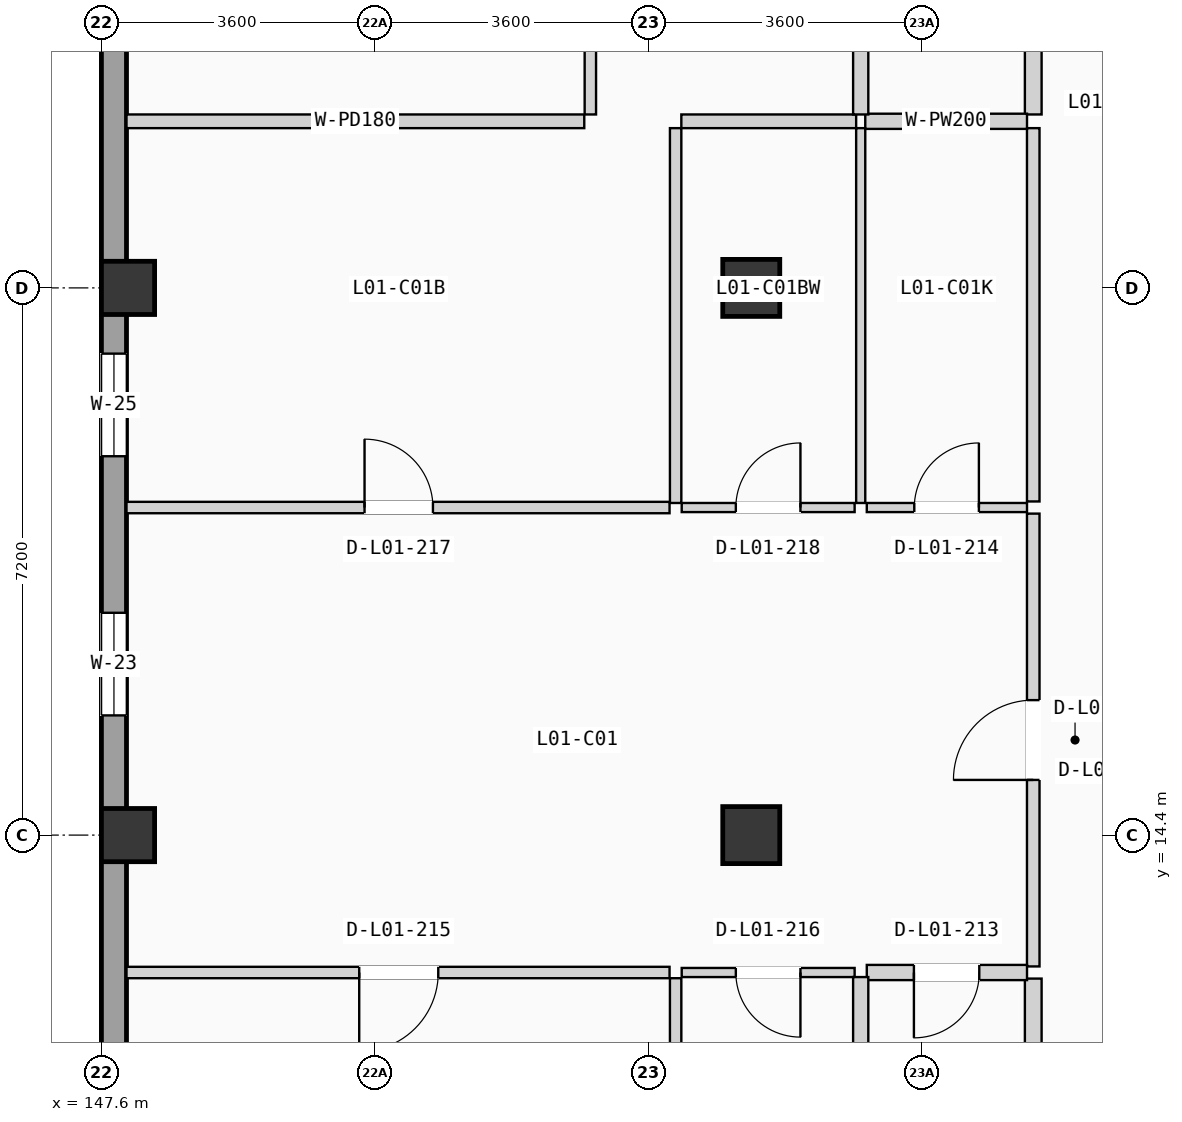
"""IFC4 building model, lengths in metres.
Left out: names, types, materials, properties, quantities, classifications, styles, units other than length and angle.
Written with IfcOpenShell. Run it as: python <this file> out.ifc"""

import sys

from ifc_helpers import new_model, si_unit, direction, frame, frame_2d, origin, origin_2d, place, context, subcontext, project, spatial, rectangle, extrude, element, fill, save


model = new_model("IFC4")
c1 = context("Model", 3, precision=1e-05, world=origin(), true_north=direction((0.0, 1.0)))
c2 = subcontext(c1, "Body", "Model", "MODEL_VIEW")
j1 = project(units=[si_unit("LENGTHUNIT", "METRE"), si_unit("PLANEANGLEUNIT", "RADIAN")], contexts=[c1])
p1 = place(None, origin())
s1 = spatial("IfcSite", under=j1, at=p1, CompositionType="ELEMENT")
p2 = place(p1, origin())
s2 = spatial("IfcBuilding", under=s1, at=p2, CompositionType="ELEMENT")
p3 = place(p2, frame((0.0, 0.0, 4.9)))
s3 = spatial("IfcBuildingStorey", under=s2, at=p3, CompositionType="ELEMENT", Elevation=4.9)
for number, where, z_axis, x_axis in (
    (1, (147.95, 14.4, 0.0), (0.0, 0.0, 1.0), (1.0, 0.0, 0.0)),
    (2, (147.95, 21.6, 0.0), (0.0, 0.0, 1.0), (1.0, 0.0, 0.0)),
):
    element("IfcColumn", number, at=place(p3, frame(where, z_axis=z_axis, x_axis=x_axis)), inside=s3, PredefinedType="COLUMN", context=c2, shape_type="SweptSolid", body=[
        extrude(rectangle(XDim=0.7, YDim=0.7, at=origin_2d()), origin(), (0.0, 0.0, 1.0), 3.675),
    ])
for number, where, z_axis, x_axis in (
    (3, (156.15, 14.4, 0.0), (0.0, 0.0, 1.0), (1.0, 0.0, 0.0)),
    (4, (156.15, 21.6, 0.0), (0.0, 0.0, 1.0), (1.0, 0.0, 0.0)),
):
    element("IfcColumn", number, at=place(p3, frame(where, z_axis=z_axis, x_axis=x_axis)), inside=s3, PredefinedType="COLUMN", context=c2, shape_type="SweptSolid", body=[
        extrude(rectangle(XDim=0.75, YDim=0.75, at=origin_2d()), origin(), (0.0, 0.0, 1.0), 3.675),
    ])
p4 = place(p3, frame((147.765, 0.33, 0.0), z_axis=(0.0, 0.0, 1.0), x_axis=(0.0, 1.0, 0.0)))
e5 = element("IfcWall", 5, at=p4, inside=s3, PredefinedType="SOLIDWALL", context=c2, shape_type="SweptSolid", body=[
    extrude(rectangle(XDim=49.74, YDim=0.33, at=frame_2d((24.87, 0.0))), origin(), (0.0, 0.0, 1.0), 3.415),
])
p5 = place(p4, frame((15.645, 0.0, 0.9)))
e6 = element("IfcOpeningElement", 6, at=p5, cuts=e5, PredefinedType="OPENING", context=c2, shape_type="SweptSolid", body=[
    extrude(rectangle(XDim=1.35, YDim=1.5, at=frame_2d((0.675, 0.75))), frame((0.0, 0.175, 0.0), z_axis=(0.0, -1.0, 0.0), x_axis=(1.0, 0.0, 0.0)), (0.0, 0.0, 1.0), 0.35),
])
p6 = place(p4, frame((9.051, 0.0, 0.9)))
e7 = element("IfcOpeningElement", 7, at=p6, cuts=e5, PredefinedType="OPENING", context=c2, shape_type="SweptSolid", body=[
    extrude(rectangle(XDim=1.35, YDim=1.65, at=frame_2d((0.675, 0.825))), frame((0.0, 0.175, 0.0), z_axis=(0.0, -1.0, 0.0), x_axis=(1.0, 0.0, 0.0)), (0.0, 0.0, 1.0), 0.35),
])
p7 = place(p4, frame((19.055, 0.0, 0.9)))
e8 = element("IfcOpeningElement", 8, at=p7, cuts=e5, PredefinedType="OPENING", context=c2, shape_type="SweptSolid", body=[
    extrude(rectangle(XDim=1.35, YDim=1.8, at=frame_2d((0.675, 0.9))), frame((0.0, 0.175, 0.0), z_axis=(0.0, -1.0, 0.0), x_axis=(1.0, 0.0, 0.0)), (0.0, 0.0, 1.0), 0.35),
])
p8 = place(p4, frame((31.351, 0.0, 0.9)))
e9 = element("IfcOpeningElement", 9, at=p8, cuts=e5, PredefinedType="OPENING", context=c2, shape_type="SweptSolid", body=[
    extrude(rectangle(XDim=1.48, YDim=1.2, at=frame_2d((0.74, 0.6))), frame((0.0, 0.175, 0.0), z_axis=(0.0, -1.0, 0.0), x_axis=(1.0, 0.0, 0.0)), (0.0, 0.0, 1.0), 0.35),
])
p9 = place(p4, frame((25.136, 0.0, 0.9)))
e10 = element("IfcOpeningElement", 10, at=p9, cuts=e5, PredefinedType="OPENING", context=c2, shape_type="SweptSolid", body=[
    extrude(rectangle(XDim=1.48, YDim=1.35, at=frame_2d((0.74, 0.675))), frame((0.0, 0.175, 0.0), z_axis=(0.0, -1.0, 0.0), x_axis=(1.0, 0.0, 0.0)), (0.0, 0.0, 1.0), 0.35),
])
p10 = place(p4, frame((38.465, 0.0, 0.9)))
e11 = element("IfcOpeningElement", 11, at=p10, cuts=e5, PredefinedType="OPENING", context=c2, shape_type="SweptSolid", body=[
    extrude(rectangle(XDim=1.48, YDim=1.5, at=frame_2d((0.74, 0.75))), frame((0.0, 0.175, 0.0), z_axis=(0.0, -1.0, 0.0), x_axis=(1.0, 0.0, 0.0)), (0.0, 0.0, 1.0), 0.35),
])
p11 = place(p3, frame((159.86, 12.672, 0.0), z_axis=(0.0, 0.0, 1.0), x_axis=(0.0, 1.0, 0.0)))
e12 = element("IfcWall", 12, at=p11, inside=s3, PredefinedType="PARTITIONING", context=c2, shape_type="SweptSolid", body=[
    extrude(rectangle(XDim=5.958, YDim=0.165, at=frame_2d((2.979, 0.0))), origin(), (0.0, 0.0, 1.0), 3.395),
])
p12 = place(p11, frame((2.454, 0.0, 0.0)))
e13 = element("IfcOpeningElement", 13, at=p12, cuts=e12, PredefinedType="OPENING", context=c2, shape_type="SweptSolid", body=[
    extrude(rectangle(XDim=1.05, YDim=2.13, at=frame_2d((0.525, 1.065))), frame((0.0, 0.093, 0.0), z_axis=(0.0, -1.0, 0.0), x_axis=(1.0, 0.0, 0.0)), (0.0, 0.0, 1.0), 0.185),
])
p13 = place(p3, frame((159.86, 7.6, 0.0), z_axis=(0.0, 0.0, 1.0), x_axis=(0.0, 1.0, 0.0)))
e14 = element("IfcWall", 14, at=p13, inside=s3, PredefinedType="PLUMBINGWALL", context=c2, shape_type="SweptSolid", body=[
    extrude(rectangle(XDim=4.912, YDim=0.22, at=frame_2d((2.456, 0.0))), origin(), (0.0, 0.0, 1.0), 3.395),
])
p14 = place(p3, frame((159.86, 18.79, 0.0), z_axis=(0.0, 0.0, 1.0), x_axis=(0.0, 1.0, 0.0)))
e15 = element("IfcWall", 15, at=p14, inside=s3, PredefinedType="PARTITIONING", context=c2, shape_type="SweptSolid", body=[
    extrude(rectangle(XDim=4.912, YDim=0.165, at=frame_2d((2.456, 0.0))), origin(), (0.0, 0.0, 1.0), 3.395),
])
p15 = place(p3, frame((159.86, 23.882, 0.0), z_axis=(0.0, 0.0, 1.0), x_axis=(0.0, 1.0, 0.0)))
e16 = element("IfcWall", 16, at=p15, inside=s3, PredefinedType="PLUMBINGWALL", context=c2, shape_type="SweptSolid", body=[
    extrude(rectangle(XDim=5.83, YDim=0.22, at=frame_2d((2.915, 0.0))), origin(), (0.0, 0.0, 1.0), 3.395),
])
p16 = place(p3, frame((157.67, 12.592, 0.0), z_axis=(0.0, 0.0, 1.0), x_axis=(1.0, 0.0, 0.0)))
e17 = element("IfcWall", 17, at=p16, inside=s3, PredefinedType="PLUMBINGWALL", context=c2, shape_type="SweptSolid", body=[
    extrude(rectangle(XDim=2.108, YDim=0.2, at=frame_2d((1.054, 0.0))), origin(), (0.0, 0.0, 1.0), 3.395),
])
p17 = place(p16, frame((0.62, 0.0, 0.0)))
e18 = element("IfcOpeningElement", 18, at=p17, cuts=e17, PredefinedType="OPENING", context=c2, shape_type="SweptSolid", body=[
    extrude(rectangle(XDim=0.86, YDim=2.0, at=frame_2d((0.43, 1.0))), frame((0.0, 0.11, 0.0), z_axis=(0.0, -1.0, 0.0), x_axis=(1.0, 0.0, 0.0)), (0.0, 0.0, 1.0), 0.22),
])
p18 = place(p3, frame((157.67, 18.71, 0.0), z_axis=(0.0, 0.0, 1.0), x_axis=(1.0, 0.0, 0.0)))
e19 = element("IfcWall", 19, at=p18, inside=s3, PredefinedType="PARTITIONING", context=c2, shape_type="SweptSolid", body=[
    extrude(rectangle(XDim=2.108, YDim=0.12, at=frame_2d((1.054, 0.0))), origin(), (0.0, 0.0, 1.0), 3.395),
])
p19 = place(p18, frame((0.625, 0.0, 0.0)))
e20 = element("IfcOpeningElement", 20, at=p19, cuts=e19, PredefinedType="OPENING", context=c2, shape_type="SweptSolid", body=[
    extrude(rectangle(XDim=0.85, YDim=2.01, at=frame_2d((0.425, 1.005))), frame((0.0, 0.07, 0.0), z_axis=(0.0, -1.0, 0.0), x_axis=(1.0, 0.0, 0.0)), (0.0, 0.0, 1.0), 0.14),
])
p20 = place(p3, frame((147.93, 12.592, 0.0), z_axis=(0.0, 0.0, 1.0), x_axis=(1.0, 0.0, 0.0)))
e21 = element("IfcWall", 21, at=p20, inside=s3, PredefinedType="PARTITIONING", context=c2, shape_type="SweptSolid", body=[
    extrude(rectangle(XDim=7.145, YDim=0.15, at=frame_2d((3.573, 0.0))), origin(), (0.0, 0.0, 1.0), 3.395),
])
p21 = place(p20, frame((3.062, 0.0, 0.0)))
e22 = element("IfcOpeningElement", 22, at=p21, cuts=e21, PredefinedType="OPENING", context=c2, shape_type="SweptSolid", body=[
    extrude(rectangle(XDim=1.04, YDim=2.08, at=frame_2d((0.52, 1.04))), frame((0.0, 0.085, 0.0), z_axis=(0.0, -1.0, 0.0), x_axis=(1.0, 0.0, 0.0)), (0.0, 0.0, 1.0), 0.17),
])
p22 = place(p3, frame((155.235, 12.592, 0.0), z_axis=(0.0, 0.0, 1.0), x_axis=(1.0, 0.0, 0.0)))
e23 = element("IfcWall", 23, at=p22, inside=s3, PredefinedType="PARTITIONING", context=c2, shape_type="SweptSolid", body=[
    extrude(rectangle(XDim=2.275, YDim=0.12, at=frame_2d((1.137, 0.0))), origin(), (0.0, 0.0, 1.0), 3.395),
])
p23 = place(p22, frame((0.712, 0.0, 0.0)))
e24 = element("IfcOpeningElement", 24, at=p23, cuts=e23, PredefinedType="OPENING", context=c2, shape_type="SweptSolid", body=[
    extrude(rectangle(XDim=0.85, YDim=2.01, at=frame_2d((0.425, 1.005))), frame((0.0, 0.07, 0.0), z_axis=(0.0, -1.0, 0.0), x_axis=(1.0, 0.0, 0.0)), (0.0, 0.0, 1.0), 0.14),
])
p24 = place(p3, frame((147.93, 18.71, 0.0), z_axis=(0.0, 0.0, 1.0), x_axis=(1.0, 0.0, 0.0)))
e25 = element("IfcWall", 25, at=p24, inside=s3, PredefinedType="PARTITIONING", context=c2, shape_type="SweptSolid", body=[
    extrude(rectangle(XDim=7.145, YDim=0.15, at=frame_2d((3.573, 0.0))), origin(), (0.0, 0.0, 1.0), 3.395),
])
p25 = place(p24, frame((3.132, 0.0, 0.0)))
e26 = element("IfcOpeningElement", 26, at=p25, cuts=e25, PredefinedType="OPENING", context=c2, shape_type="SweptSolid", body=[
    extrude(rectangle(XDim=0.9, YDim=2.04, at=frame_2d((0.45, 1.02))), frame((0.0, 0.085, 0.0), z_axis=(0.0, -1.0, 0.0), x_axis=(1.0, 0.0, 0.0)), (0.0, 0.0, 1.0), 0.17),
])
p26 = place(p3, frame((155.235, 18.71, 0.0), z_axis=(0.0, 0.0, 1.0), x_axis=(1.0, 0.0, 0.0)))
e27 = element("IfcWall", 27, at=p26, inside=s3, PredefinedType="PARTITIONING", context=c2, shape_type="SweptSolid", body=[
    extrude(rectangle(XDim=2.275, YDim=0.12, at=frame_2d((1.137, 0.0))), origin(), (0.0, 0.0, 1.0), 3.395),
])
p27 = place(p26, frame((0.712, 0.0, 0.0)))
e28 = element("IfcOpeningElement", 28, at=p27, cuts=e27, PredefinedType="OPENING", context=c2, shape_type="SweptSolid", body=[
    extrude(rectangle(XDim=0.85, YDim=2.01, at=frame_2d((0.425, 1.005))), frame((0.0, 0.07, 0.0), z_axis=(0.0, -1.0, 0.0), x_axis=(1.0, 0.0, 0.0)), (0.0, 0.0, 1.0), 0.14),
])
p28 = place(p3, frame((157.59, 7.6, 0.0), z_axis=(0.0, 0.0, 1.0), x_axis=(0.0, 1.0, 0.0)))
e29 = element("IfcWall", 29, at=p28, inside=s3, PredefinedType="PLUMBINGWALL", context=c2, shape_type="SweptSolid", body=[
    extrude(rectangle(XDim=4.932, YDim=0.2, at=frame_2d((2.466, 0.0))), origin(), (0.0, 0.0, 1.0), 3.395),
])
p29 = place(p28, frame((2.031, 0.0, 0.0)))
e30 = element("IfcOpeningElement", 30, at=p29, cuts=e29, PredefinedType="OPENING", context=c2, shape_type="SweptSolid", body=[
    extrude(rectangle(XDim=0.85, YDim=2.01, at=frame_2d((0.425, 1.005))), frame((0.0, 0.11, 0.0), z_axis=(0.0, -1.0, 0.0), x_axis=(1.0, 0.0, 0.0)), (0.0, 0.0, 1.0), 0.22),
])
p30 = place(p3, frame((157.59, 18.77, 0.0), z_axis=(0.0, 0.0, 1.0), x_axis=(0.0, 1.0, 0.0)))
e31 = element("IfcWall", 31, at=p30, inside=s3, PredefinedType="PARTITIONING", context=c2, shape_type="SweptSolid", body=[
    extrude(rectangle(XDim=4.932, YDim=0.12, at=frame_2d((2.466, 0.0))), origin(), (0.0, 0.0, 1.0), 3.395),
])
p31 = place(p3, frame((157.65, 23.792, 0.0), z_axis=(0.0, 0.0, 1.0), x_axis=(1.0, 0.0, 0.0)))
e32 = element("IfcWall", 32, at=p31, inside=s3, PredefinedType="PLUMBINGWALL", context=c2, shape_type="SweptSolid", body=[
    extrude(rectangle(XDim=2.128, YDim=0.2, at=frame_2d((1.064, 0.0))), origin(), (0.0, 0.0, 1.0), 3.395),
])
p32 = place(p3, frame((155.155, 7.6, 0.0), z_axis=(0.0, 0.0, 1.0), x_axis=(0.0, 1.0, 0.0)))
e33 = element("IfcWall", 33, at=p32, inside=s3, PredefinedType="PARTITIONING", context=c2, shape_type="SweptSolid", body=[
    extrude(rectangle(XDim=4.917, YDim=0.15, at=frame_2d((2.458, 0.0))), origin(), (0.0, 0.0, 1.0), 3.395),
])
p33 = place(p3, frame((155.155, 18.77, 0.0), z_axis=(0.0, 0.0, 1.0), x_axis=(0.0, 1.0, 0.0)))
e34 = element("IfcWall", 34, at=p33, inside=s3, PredefinedType="PARTITIONING", context=c2, shape_type="SweptSolid", body=[
    extrude(rectangle(XDim=4.932, YDim=0.15, at=frame_2d((2.466, 0.0))), origin(), (0.0, 0.0, 1.0), 3.395),
])
p34 = place(p3, frame((147.93, 23.792, 0.0), z_axis=(0.0, 0.0, 1.0), x_axis=(1.0, 0.0, 0.0)))
e35 = element("IfcWall", 35, at=p34, inside=s3, PredefinedType="PARTITIONING", context=c2, shape_type="SweptSolid", body=[
    extrude(rectangle(XDim=6.023, YDim=0.18, at=frame_2d((3.011, 0.0))), origin(), (0.0, 0.0, 1.0), 3.395),
])
p35 = place(p3, frame((155.23, 23.792, 0.0), z_axis=(0.0, 0.0, 1.0), x_axis=(1.0, 0.0, 0.0)))
e36 = element("IfcWall", 36, at=p35, inside=s3, PredefinedType="PARTITIONING", context=c2, shape_type="SweptSolid", body=[
    extrude(rectangle(XDim=2.3, YDim=0.18, at=frame_2d((1.15, 0.0))), origin(), (0.0, 0.0, 1.0), 3.395),
])
p36 = place(p3, frame((157.59, 23.882, 0.0), z_axis=(0.0, 0.0, 1.0), x_axis=(0.0, 1.0, 0.0)))
e37 = element("IfcWall", 37, at=p36, inside=s3, PredefinedType="PLUMBINGWALL", context=c2, shape_type="SweptSolid", body=[
    extrude(rectangle(XDim=5.85, YDim=0.2, at=frame_2d((2.925, 0.0))), origin(), (0.0, 0.0, 1.0), 3.395),
])
p37 = place(p36, frame((2.49, 0.0, 0.0)))
e38 = element("IfcOpeningElement", 38, at=p37, cuts=e37, PredefinedType="OPENING", context=c2, shape_type="SweptSolid", body=[
    extrude(rectangle(XDim=0.85, YDim=2.01, at=frame_2d((0.425, 1.005))), frame((0.0, 0.11, 0.0), z_axis=(0.0, -1.0, 0.0), x_axis=(1.0, 0.0, 0.0)), (0.0, 0.0, 1.0), 0.22),
])
p38 = place(p3, frame((154.033, 23.882, 0.0), z_axis=(0.0, 0.0, 1.0), x_axis=(0.0, 1.0, 0.0)))
e39 = element("IfcWall", 39, at=p38, inside=s3, PredefinedType="PARTITIONING", context=c2, shape_type="SweptSolid", body=[
    extrude(rectangle(XDim=5.835, YDim=0.15, at=frame_2d((2.917, 0.0))), origin(), (0.0, 0.0, 1.0), 3.395),
])
p39 = place(p5, origin())
e40 = element("IfcWindow", 40, at=p39, inside=s3, PartitioningType="SINGLE_PANEL", PredefinedType="WINDOW", context=c2, shape_type="SweptSolid", body=[
    extrude(rectangle(XDim=1.35, YDim=1.5, at=frame_2d((0.675, 0.75))), frame((0.0, 0.03, 0.0), z_axis=(0.0, -1.0, 0.0), x_axis=(1.0, 0.0, 0.0)), (0.0, 0.0, 1.0), 0.06),
])
fill(e6, e40)
p40 = place(p7, origin())
e41 = element("IfcWindow", 41, at=p40, inside=s3, PartitioningType="SINGLE_PANEL", PredefinedType="WINDOW", context=c2, shape_type="SweptSolid", body=[
    extrude(rectangle(XDim=1.35, YDim=1.8, at=frame_2d((0.675, 0.9))), frame((0.0, 0.03, 0.0), z_axis=(0.0, -1.0, 0.0), x_axis=(1.0, 0.0, 0.0)), (0.0, 0.0, 1.0), 0.06),
])
fill(e8, e41)
p41 = place(p12, origin())
e42 = element("IfcDoor", 42, at=p41, inside=s3, OperationType="SINGLE_SWING_LEFT", PredefinedType="DOOR", context=c2, shape_type="SweptSolid", body=[
    extrude(rectangle(XDim=1.05, YDim=2.13, at=frame_2d((0.525, 1.065))), frame((0.0, 0.025, 0.0), z_axis=(0.0, -1.0, 0.0), x_axis=(1.0, 0.0, 0.0)), (0.0, 0.0, 1.0), 0.05),
])
fill(e13, e42)
p42 = place(p17, frame((0.86, 0.0, 0.0), z_axis=(0.0, 0.0, 1.0), x_axis=(-1.0, 0.0, 0.0)))
e43 = element("IfcDoor", 43, at=p42, inside=s3, OperationType="SINGLE_SWING_LEFT", PredefinedType="DOOR", context=c2, shape_type="SweptSolid", body=[
    extrude(rectangle(XDim=0.86, YDim=2.0, at=frame_2d((0.43, 1.0))), frame((0.0, 0.025, 0.0), z_axis=(0.0, -1.0, 0.0), x_axis=(1.0, 0.0, 0.0)), (0.0, 0.0, 1.0), 0.05),
])
fill(e18, e43)
p43 = place(p19, origin())
e44 = element("IfcDoor", 44, at=p43, inside=s3, OperationType="SINGLE_SWING_RIGHT", PredefinedType="DOOR", context=c2, shape_type="SweptSolid", body=[
    extrude(rectangle(XDim=0.85, YDim=2.01, at=frame_2d((0.425, 1.005))), frame((0.0, 0.025, 0.0), z_axis=(0.0, -1.0, 0.0), x_axis=(1.0, 0.0, 0.0)), (0.0, 0.0, 1.0), 0.05),
])
fill(e20, e44)
p44 = place(p21, frame((1.04, 0.0, 0.0), z_axis=(0.0, 0.0, 1.0), x_axis=(-1.0, 0.0, 0.0)))
e45 = element("IfcDoor", 45, at=p44, inside=s3, OperationType="SINGLE_SWING_LEFT", PredefinedType="DOOR", context=c2, shape_type="SweptSolid", body=[
    extrude(rectangle(XDim=1.04, YDim=2.08, at=frame_2d((0.52, 1.04))), frame((0.0, 0.025, 0.0), z_axis=(0.0, -1.0, 0.0), x_axis=(1.0, 0.0, 0.0)), (0.0, 0.0, 1.0), 0.05),
])
fill(e22, e45)
p45 = place(p23, frame((0.85, 0.0, 0.0), z_axis=(0.0, 0.0, 1.0), x_axis=(-1.0, 0.0, 0.0)))
e46 = element("IfcDoor", 46, at=p45, inside=s3, OperationType="SINGLE_SWING_RIGHT", PredefinedType="DOOR", context=c2, shape_type="SweptSolid", body=[
    extrude(rectangle(XDim=0.85, YDim=2.01, at=frame_2d((0.425, 1.005))), frame((0.0, 0.025, 0.0), z_axis=(0.0, -1.0, 0.0), x_axis=(1.0, 0.0, 0.0)), (0.0, 0.0, 1.0), 0.05),
])
fill(e24, e46)
p46 = place(p25, origin())
e47 = element("IfcDoor", 47, at=p46, inside=s3, OperationType="SINGLE_SWING_LEFT", PredefinedType="DOOR", context=c2, shape_type="SweptSolid", body=[
    extrude(rectangle(XDim=0.9, YDim=2.04, at=frame_2d((0.45, 1.02))), frame((0.0, 0.025, 0.0), z_axis=(0.0, -1.0, 0.0), x_axis=(1.0, 0.0, 0.0)), (0.0, 0.0, 1.0), 0.05),
])
fill(e26, e47)
p47 = place(p27, origin())
e48 = element("IfcDoor", 48, at=p47, inside=s3, OperationType="SINGLE_SWING_RIGHT", PredefinedType="DOOR", context=c2, shape_type="SweptSolid", body=[
    extrude(rectangle(XDim=0.85, YDim=2.01, at=frame_2d((0.425, 1.005))), frame((0.0, 0.025, 0.0), z_axis=(0.0, -1.0, 0.0), x_axis=(1.0, 0.0, 0.0)), (0.0, 0.0, 1.0), 0.05),
])
fill(e28, e48)
save(model, sys.argv[1])
